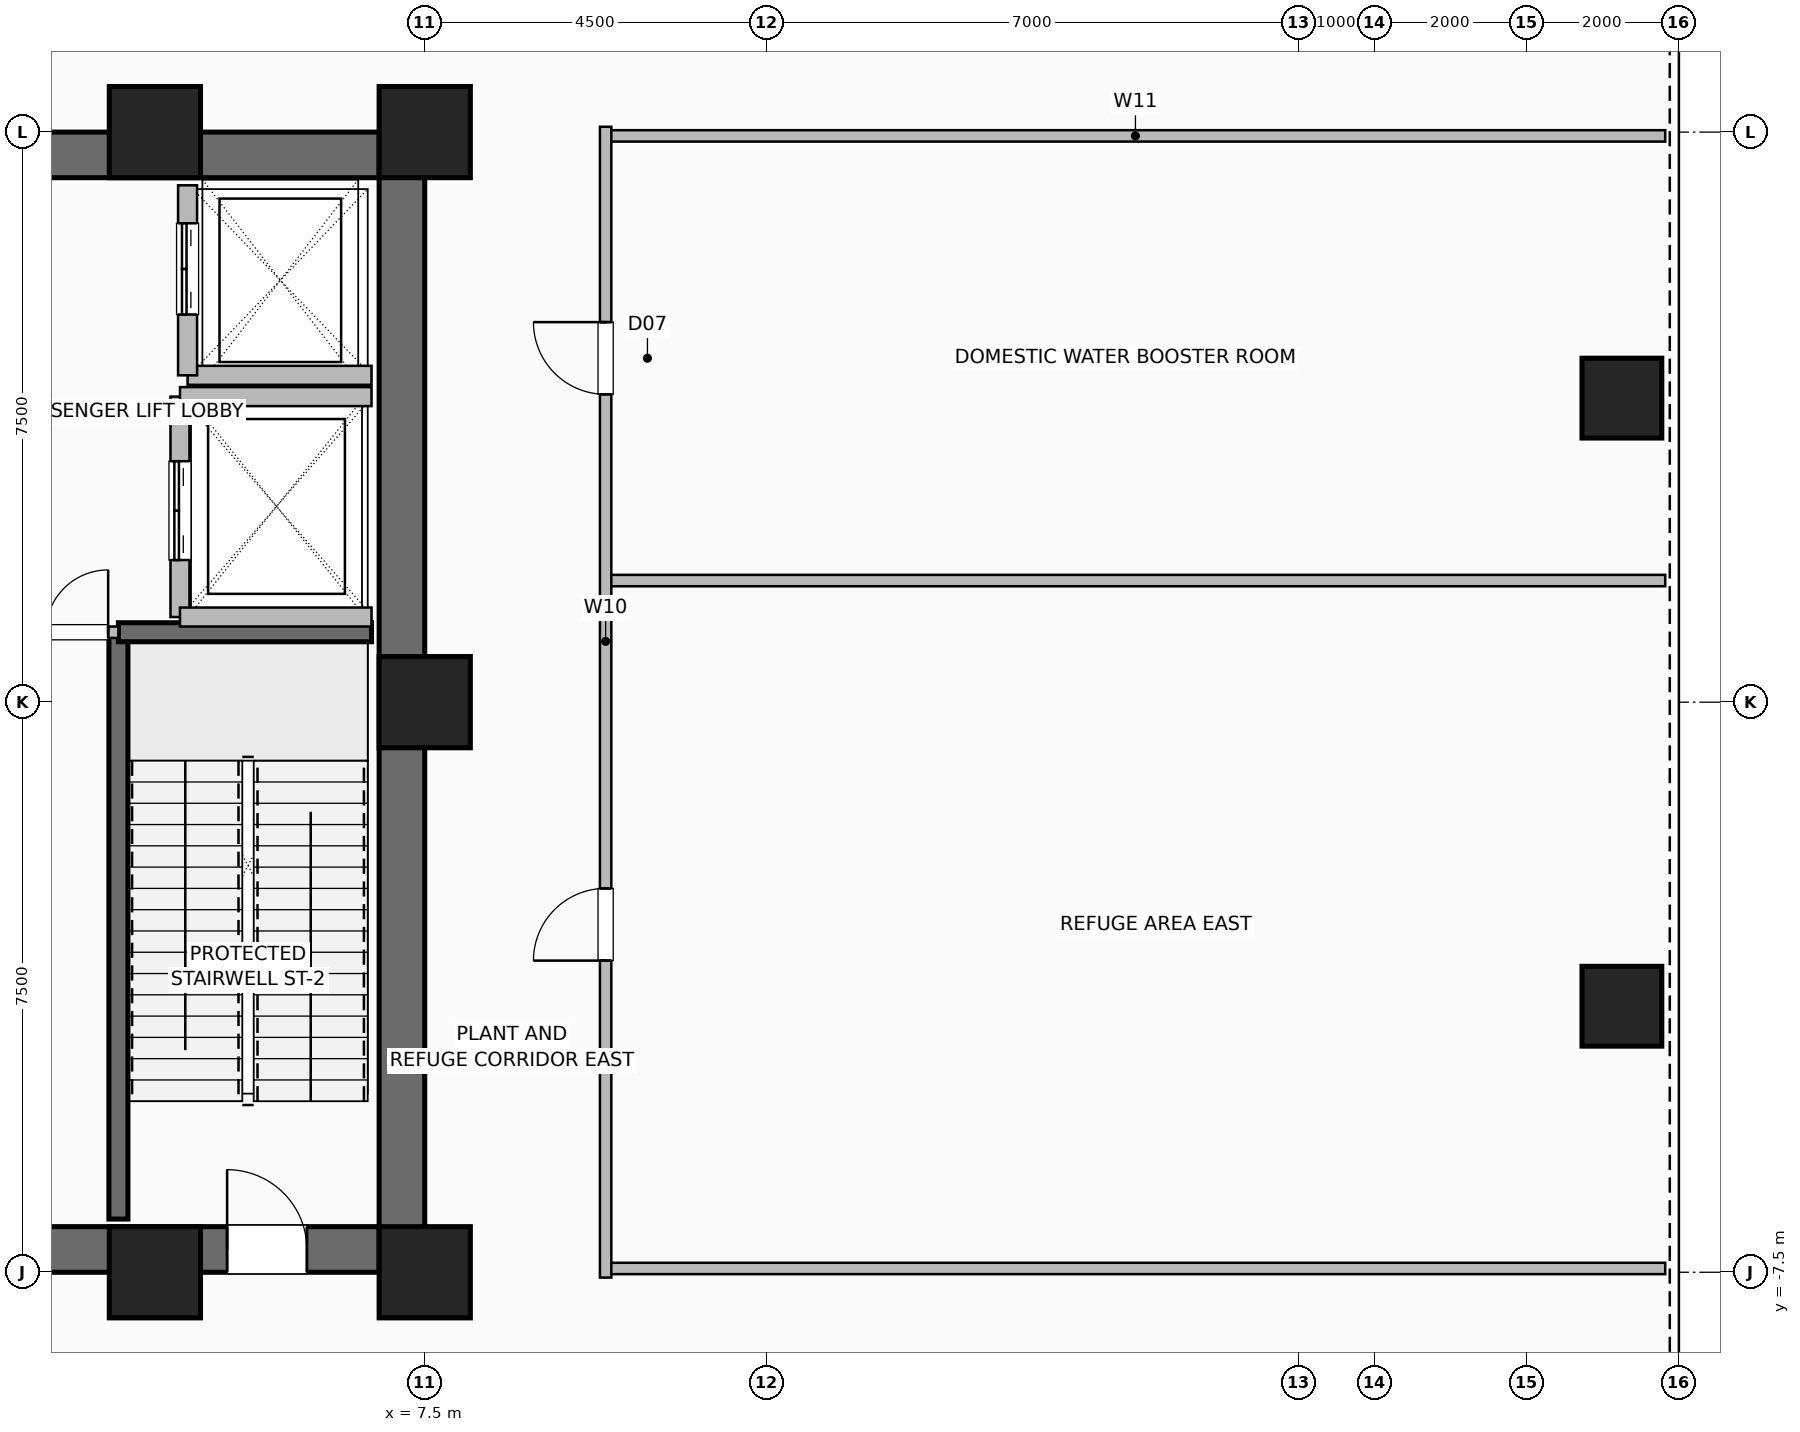
"""IFC4 building model, lengths in metres.
Left out: names, types, materials, properties, quantities, classifications, styles, units other than length and angle.
Written with IfcOpenShell. Run it as: python <this file> out.ifc"""

import sys

from ifc_helpers import new_model, si_unit, direction, frame, frame_2d, origin, origin_2d, place, context, subcontext, project, spatial, rectangle, hollow_rectangle, extrude, element, fill, save


model = new_model("IFC4")
c1 = context("Model", 3, precision=1e-05, world=origin(), true_north=direction((0.0, 1.0)))
c2 = subcontext(c1, "Body", "Model", "MODEL_VIEW")
j1 = project(units=[si_unit("LENGTHUNIT", "METRE"), si_unit("PLANEANGLEUNIT", "RADIAN")], contexts=[c1])
p1 = place(None, origin())
s1 = spatial("IfcSite", under=j1, at=p1, CompositionType="ELEMENT")
p2 = place(p1, origin())
s2 = spatial("IfcBuilding", under=s1, at=p2, CompositionType="ELEMENT")
p3 = place(p2, frame((0.0, 0.0, 88.0)))
s3 = spatial("IfcBuildingStorey", under=s2, at=p3, CompositionType="ELEMENT", Elevation=88.0)
for number, where, z_axis, x_axis in (
    (1, (3.95, -7.5, 0.0), (0.0, 0.0, 1.0), (1.0, 0.0, 0.0)),
    (2, (7.5, -7.5, 0.0), (0.0, 0.0, 1.0), (1.0, 0.0, 0.0)),
    (3, (7.5, 0.0, 0.0), (0.0, 0.0, 1.0), (1.0, 0.0, 0.0)),
    (4, (7.5, 7.5, 0.0), (0.0, 0.0, 1.0), (1.0, 0.0, 0.0)),
    (5, (3.95, 7.5, 0.0), (0.0, 0.0, 1.0), (1.0, 0.0, 0.0)),
):
    element("IfcColumn", number, at=place(p3, frame(where, z_axis=z_axis, x_axis=x_axis)), inside=s3, PredefinedType="COLUMN", context=c2, shape_type="SweptSolid", body=[
        extrude(hollow_rectangle(XDim=1.2, YDim=1.2, WallThickness=0.055, at=origin_2d()), origin(), (0.0, 0.0, 1.0), 6.0),
    ])
for number, where, z_axis, x_axis in (
    (6, (23.25, -4.0, 0.0), (0.0, 0.0, 1.0), (1.0, 0.0, 0.0)),
    (7, (23.25, 4.0, 0.0), (0.0, 0.0, 1.0), (1.0, 0.0, 0.0)),
):
    element("IfcColumn", number, at=place(p3, frame(where, z_axis=z_axis, x_axis=x_axis)), inside=s3, PredefinedType="COLUMN", context=c2, shape_type="SweptSolid", body=[
        extrude(hollow_rectangle(XDim=1.05, YDim=1.05, WallThickness=0.05, at=origin_2d()), origin(), (0.0, 0.0, 1.0), 5.6),
    ])
p4 = place(p3, frame((-7.5, -7.2, 0.0), z_axis=(0.0, 0.0, 1.0), x_axis=(1.0, 0.0, 0.0)))
e8 = element("IfcWall", 8, at=p4, inside=s3, PredefinedType="SHEAR", context=c2, shape_type="SweptSolid", body=[
    extrude(rectangle(XDim=15.0, YDim=0.6, at=frame_2d((7.5, 0.0))), origin(), (0.0, 0.0, 1.0), 5.6),
])
p5 = place(p4, frame((1.55, 0.0, 0.0)))
e9 = element("IfcOpeningElement", 9, at=p5, cuts=e8, PredefinedType="OPENING", context=c2, shape_type="SweptSolid", body=[
    extrude(rectangle(XDim=1.05, YDim=2.08, at=frame_2d((0.525, 1.04))), frame((0.0, 0.31, 0.0), z_axis=(0.0, -1.0, 0.0), x_axis=(1.0, 0.0, 0.0)), (0.0, 0.0, 1.0), 0.62),
])
p6 = place(p4, frame((12.4, 0.0, 0.0)))
e10 = element("IfcOpeningElement", 10, at=p6, cuts=e8, PredefinedType="OPENING", context=c2, shape_type="SweptSolid", body=[
    extrude(rectangle(XDim=1.05, YDim=2.08, at=frame_2d((0.525, 1.04))), frame((0.0, 0.31, 0.0), z_axis=(0.0, -1.0, 0.0), x_axis=(1.0, 0.0, 0.0)), (0.0, 0.0, 1.0), 0.62),
])
p7 = place(p4, frame((4.64, 0.0, 0.0)))
e11 = element("IfcOpeningElement", 11, at=p7, cuts=e8, PredefinedType="OPENING", context=c2, shape_type="SweptSolid", body=[
    extrude(rectangle(XDim=1.1, YDim=2.2, at=frame_2d((0.55, 1.1))), frame((0.0, 0.31, 0.0), z_axis=(0.0, -1.0, 0.0), x_axis=(1.0, 0.0, 0.0)), (0.0, 0.0, 1.0), 0.62),
])
p8 = place(p4, frame((6.52, 0.0, 0.0)))
e12 = element("IfcOpeningElement", 12, at=p8, cuts=e8, PredefinedType="OPENING", context=c2, shape_type="SweptSolid", body=[
    extrude(rectangle(XDim=1.1, YDim=2.2, at=frame_2d((0.55, 1.1))), frame((0.0, 0.31, 0.0), z_axis=(0.0, -1.0, 0.0), x_axis=(1.0, 0.0, 0.0)), (0.0, 0.0, 1.0), 0.62),
])
p9 = place(p4, frame((8.4, 0.0, 0.0)))
e13 = element("IfcOpeningElement", 13, at=p9, cuts=e8, PredefinedType="OPENING", context=c2, shape_type="SweptSolid", body=[
    extrude(rectangle(XDim=1.1, YDim=2.2, at=frame_2d((0.55, 1.1))), frame((0.0, 0.31, 0.0), z_axis=(0.0, -1.0, 0.0), x_axis=(1.0, 0.0, 0.0)), (0.0, 0.0, 1.0), 0.62),
])
for number, where, z_axis, x_axis in (
    (14, (-7.5, 7.2, 0.0), (0.0, 0.0, 1.0), (1.0, 0.0, 0.0)),
    (15, (7.2, -7.5, 0.0), (0.0, 0.0, 1.0), (0.0, 1.0, 0.0)),
):
    element("IfcWall", number, at=place(p3, frame(where, z_axis=z_axis, x_axis=x_axis)), inside=s3, PredefinedType="SHEAR", context=c2, shape_type="SweptSolid", body=[
        extrude(rectangle(XDim=15.0, YDim=0.6, at=frame_2d((7.5, 0.0))), origin(), (0.0, 0.0, 1.0), 5.6),
    ])
p10 = place(p3, frame((3.47, -6.8, 0.0), z_axis=(0.0, 0.0, 1.0), x_axis=(0.0, 1.0, 0.0)))
e16 = element("IfcWall", 16, at=p10, inside=s3, PredefinedType="SHEAR", context=c2, shape_type="SweptSolid", body=[
    extrude(rectangle(XDim=7.72, YDim=0.25, at=frame_2d((3.86, 0.0))), origin(), (0.0, 0.0, 1.0), 5.6),
])
p11 = place(p3, frame((3.47, 0.92, 0.0), z_axis=(0.0, 0.0, 1.0), x_axis=(1.0, 0.0, 0.0)))
e17 = element("IfcWall", 17, at=p11, inside=s3, PredefinedType="SHEAR", context=c2, shape_type="SweptSolid", body=[
    extrude(rectangle(XDim=3.33, YDim=0.25, at=frame_2d((1.665, 0.0))), origin(), (0.0, 0.0, 1.0), 5.6),
])
p12 = place(p3, frame((4.38, 4.3, 0.0), z_axis=(0.0, 0.0, 1.0), x_axis=(1.0, 0.0, 0.0)))
e18 = element("IfcWall", 18, at=p12, inside=s3, PredefinedType="SHEAR", context=c2, shape_type="SweptSolid", body=[
    extrude(rectangle(XDim=2.42, YDim=0.25, at=frame_2d((1.21, 0.0))), origin(), (0.0, 0.0, 1.0), 5.6),
])
p13 = place(p3, frame((4.38, 4.3, 0.0), z_axis=(0.0, 0.0, 1.0), x_axis=(0.0, 1.0, 0.0)))
e19 = element("IfcWall", 19, at=p13, inside=s3, PredefinedType="SHEAR", context=c2, shape_type="SweptSolid", body=[
    extrude(rectangle(XDim=2.5, YDim=0.25, at=frame_2d((1.25, 0.0))), origin(), (0.0, 0.0, 1.0), 5.6),
])
p14 = place(p13, frame((0.8, 0.0, 0.0)))
e20 = element("IfcOpeningElement", 20, at=p14, cuts=e19, PredefinedType="OPENING", context=c2, shape_type="SweptSolid", body=[
    extrude(rectangle(XDim=1.2, YDim=2.2, at=frame_2d((0.6, 1.1))), frame((0.0, 0.135, 0.0), z_axis=(0.0, -1.0, 0.0), x_axis=(1.0, 0.0, 0.0)), (0.0, 0.0, 1.0), 0.27),
])
p15 = place(p3, frame((4.28, 1.12, 0.0), z_axis=(0.0, 0.0, 1.0), x_axis=(0.0, 1.0, 0.0)))
e21 = element("IfcWall", 21, at=p15, inside=s3, PredefinedType="SHEAR", context=c2, shape_type="SweptSolid", body=[
    extrude(rectangle(XDim=2.9, YDim=0.25, at=frame_2d((1.45, 0.0))), origin(), (0.0, 0.0, 1.0), 5.6),
])
p16 = place(p15, frame((0.75, 0.0, 0.0)))
e22 = element("IfcOpeningElement", 22, at=p16, cuts=e21, PredefinedType="OPENING", context=c2, shape_type="SweptSolid", body=[
    extrude(rectangle(XDim=1.3, YDim=2.3, at=frame_2d((0.65, 1.15))), frame((0.0, 0.135, 0.0), z_axis=(0.0, -1.0, 0.0), x_axis=(1.0, 0.0, 0.0)), (0.0, 0.0, 1.0), 0.27),
])
for number, where, z_axis, x_axis in (
    (23, (4.28, 1.12, 0.0), (0.0, 0.0, 1.0), (1.0, 0.0, 0.0)),
    (24, (4.28, 4.02, 0.0), (0.0, 0.0, 1.0), (1.0, 0.0, 0.0)),
):
    element("IfcWall", number, at=place(p3, frame(where, z_axis=z_axis, x_axis=x_axis)), inside=s3, PredefinedType="SHEAR", context=c2, shape_type="SweptSolid", body=[
        extrude(rectangle(XDim=2.52, YDim=0.25, at=frame_2d((1.26, 0.0))), origin(), (0.0, 0.0, 1.0), 5.6),
    ])
p17 = place(p3, frame((2.38, 0.92, 0.0), z_axis=(0.0, 0.0, 1.0), x_axis=(1.0, 0.0, 0.0)))
e25 = element("IfcWall", 25, at=p17, inside=s3, PredefinedType="PARTITIONING", context=c2, shape_type="SweptSolid", body=[
    extrude(rectangle(XDim=1.09, YDim=0.15, at=frame_2d((0.545, 0.0))), origin(), (0.0, 0.0, 1.0), 5.6),
])
p18 = place(p17, frame((0.135, 0.0, 0.0)))
e26 = element("IfcOpeningElement", 26, at=p18, cuts=e25, PredefinedType="OPENING", context=c2, shape_type="SweptSolid", body=[
    extrude(rectangle(XDim=0.82, YDim=2.05, at=frame_2d((0.41, 1.025))), frame((0.0, 0.085, 0.0), z_axis=(0.0, -1.0, 0.0), x_axis=(1.0, 0.0, 0.0)), (0.0, 0.0, 1.0), 0.17),
])
p19 = place(p3, frame((9.88, -7.45, 0.0), z_axis=(0.0, 0.0, 1.0), x_axis=(1.0, 0.0, 0.0)))
e27 = element("IfcWall", 27, at=p19, inside=s3, PredefinedType="PARTITIONING", context=c2, shape_type="SweptSolid", body=[
    extrude(rectangle(XDim=13.94, YDim=0.15, at=frame_2d((6.97, 0.0))), origin(), (0.0, 0.0, 1.0), 3.975),
])
p20 = place(p3, frame((9.88, 1.6, 0.0), z_axis=(0.0, 0.0, 1.0), x_axis=(1.0, 0.0, 0.0)))
e28 = element("IfcWall", 28, at=p20, inside=s3, PredefinedType="PARTITIONING", context=c2, shape_type="SweptSolid", body=[
    extrude(rectangle(XDim=13.94, YDim=0.15, at=frame_2d((6.97, 0.0))), origin(), (0.0, 0.0, 1.0), 5.6),
])
p21 = place(p3, frame((9.88, 7.45, 0.0), z_axis=(0.0, 0.0, 1.0), x_axis=(1.0, 0.0, 0.0)))
e29 = element("IfcWall", 29, at=p21, inside=s3, PredefinedType="PARTITIONING", context=c2, shape_type="SweptSolid", body=[
    extrude(rectangle(XDim=13.94, YDim=0.15, at=frame_2d((6.97, 0.0))), origin(), (0.0, 0.0, 1.0), 3.975),
])
p22 = place(p3, frame((9.88, -7.57, 0.0), z_axis=(0.0, 0.0, 1.0), x_axis=(0.0, 1.0, 0.0)))
e30 = element("IfcWall", 30, at=p22, inside=s3, PredefinedType="PARTITIONING", context=c2, shape_type="SweptSolid", body=[
    extrude(rectangle(XDim=15.14, YDim=0.15, at=frame_2d((7.57, 0.0))), origin(), (0.0, 0.0, 1.0), 5.6),
])
p23 = place(p22, frame((4.17, 0.0, 0.0)))
e31 = element("IfcOpeningElement", 31, at=p23, cuts=e30, PredefinedType="OPENING", context=c2, shape_type="SweptSolid", body=[
    extrude(rectangle(XDim=0.95, YDim=2.06, at=frame_2d((0.475, 1.03))), frame((0.0, 0.085, 0.0), z_axis=(0.0, -1.0, 0.0), x_axis=(1.0, 0.0, 0.0)), (0.0, 0.0, 1.0), 0.17),
])
p24 = place(p22, frame((11.62, 0.0, 0.0)))
e32 = element("IfcOpeningElement", 32, at=p24, cuts=e30, PredefinedType="OPENING", context=c2, shape_type="SweptSolid", body=[
    extrude(rectangle(XDim=0.95, YDim=2.06, at=frame_2d((0.475, 1.03))), frame((0.0, 0.085, 0.0), z_axis=(0.0, -1.0, 0.0), x_axis=(1.0, 0.0, 0.0)), (0.0, 0.0, 1.0), 0.17),
])
p25 = place(p6, origin())
e33 = element("IfcDoor", 33, at=p25, inside=s3, OperationType="SINGLE_SWING_LEFT", PredefinedType="DOOR", context=c2, shape_type="SweptSolid", body=[
    extrude(rectangle(XDim=1.05, YDim=2.08, at=frame_2d((0.525, 1.04))), frame((0.0, 0.025, 0.0), z_axis=(0.0, -1.0, 0.0), x_axis=(1.0, 0.0, 0.0)), (0.0, 0.0, 1.0), 0.05),
])
fill(e10, e33)
p26 = place(p14, origin())
e34 = element("IfcDoor", 34, at=p26, inside=s3, OperationType="DOUBLE_DOOR_SLIDING", PredefinedType="DOOR", context=c2, shape_type="SweptSolid", body=[
    extrude(rectangle(XDim=1.2, YDim=2.2, at=frame_2d((0.6, 1.1))), frame((0.0, 0.025, 0.0), z_axis=(0.0, -1.0, 0.0), x_axis=(1.0, 0.0, 0.0)), (0.0, 0.0, 1.0), 0.05),
])
fill(e20, e34)
p27 = place(p16, origin())
e35 = element("IfcDoor", 35, at=p27, inside=s3, OperationType="DOUBLE_DOOR_SLIDING", PredefinedType="DOOR", context=c2, shape_type="SweptSolid", body=[
    extrude(rectangle(XDim=1.3, YDim=2.3, at=frame_2d((0.65, 1.15))), frame((0.0, 0.025, 0.0), z_axis=(0.0, -1.0, 0.0), x_axis=(1.0, 0.0, 0.0)), (0.0, 0.0, 1.0), 0.05),
])
fill(e22, e35)
p28 = place(p18, origin())
e36 = element("IfcDoor", 36, at=p28, inside=s3, OperationType="SINGLE_SWING_RIGHT", PredefinedType="DOOR", context=c2, shape_type="SweptSolid", body=[
    extrude(rectangle(XDim=0.82, YDim=2.05, at=frame_2d((0.41, 1.025))), frame((0.0, 0.025, 0.0), z_axis=(0.0, -1.0, 0.0), x_axis=(1.0, 0.0, 0.0)), (0.0, 0.0, 1.0), 0.05),
])
fill(e26, e36)
p29 = place(p23, origin())
e37 = element("IfcDoor", 37, at=p29, inside=s3, OperationType="SINGLE_SWING_LEFT", PredefinedType="DOOR", context=c2, shape_type="SweptSolid", body=[
    extrude(rectangle(XDim=0.95, YDim=2.06, at=frame_2d((0.475, 1.03))), frame((0.0, 0.025, 0.0), z_axis=(0.0, -1.0, 0.0), x_axis=(1.0, 0.0, 0.0)), (0.0, 0.0, 1.0), 0.05),
])
fill(e31, e37)
p30 = place(p24, origin())
e38 = element("IfcDoor", 38, at=p30, inside=s3, OperationType="SINGLE_SWING_RIGHT", PredefinedType="DOOR", context=c2, shape_type="SweptSolid", body=[
    extrude(rectangle(XDim=0.95, YDim=2.06, at=frame_2d((0.475, 1.03))), frame((0.0, 0.025, 0.0), z_axis=(0.0, -1.0, 0.0), x_axis=(1.0, 0.0, 0.0)), (0.0, 0.0, 1.0), 0.05),
])
fill(e32, e38)
save(model, sys.argv[1])
